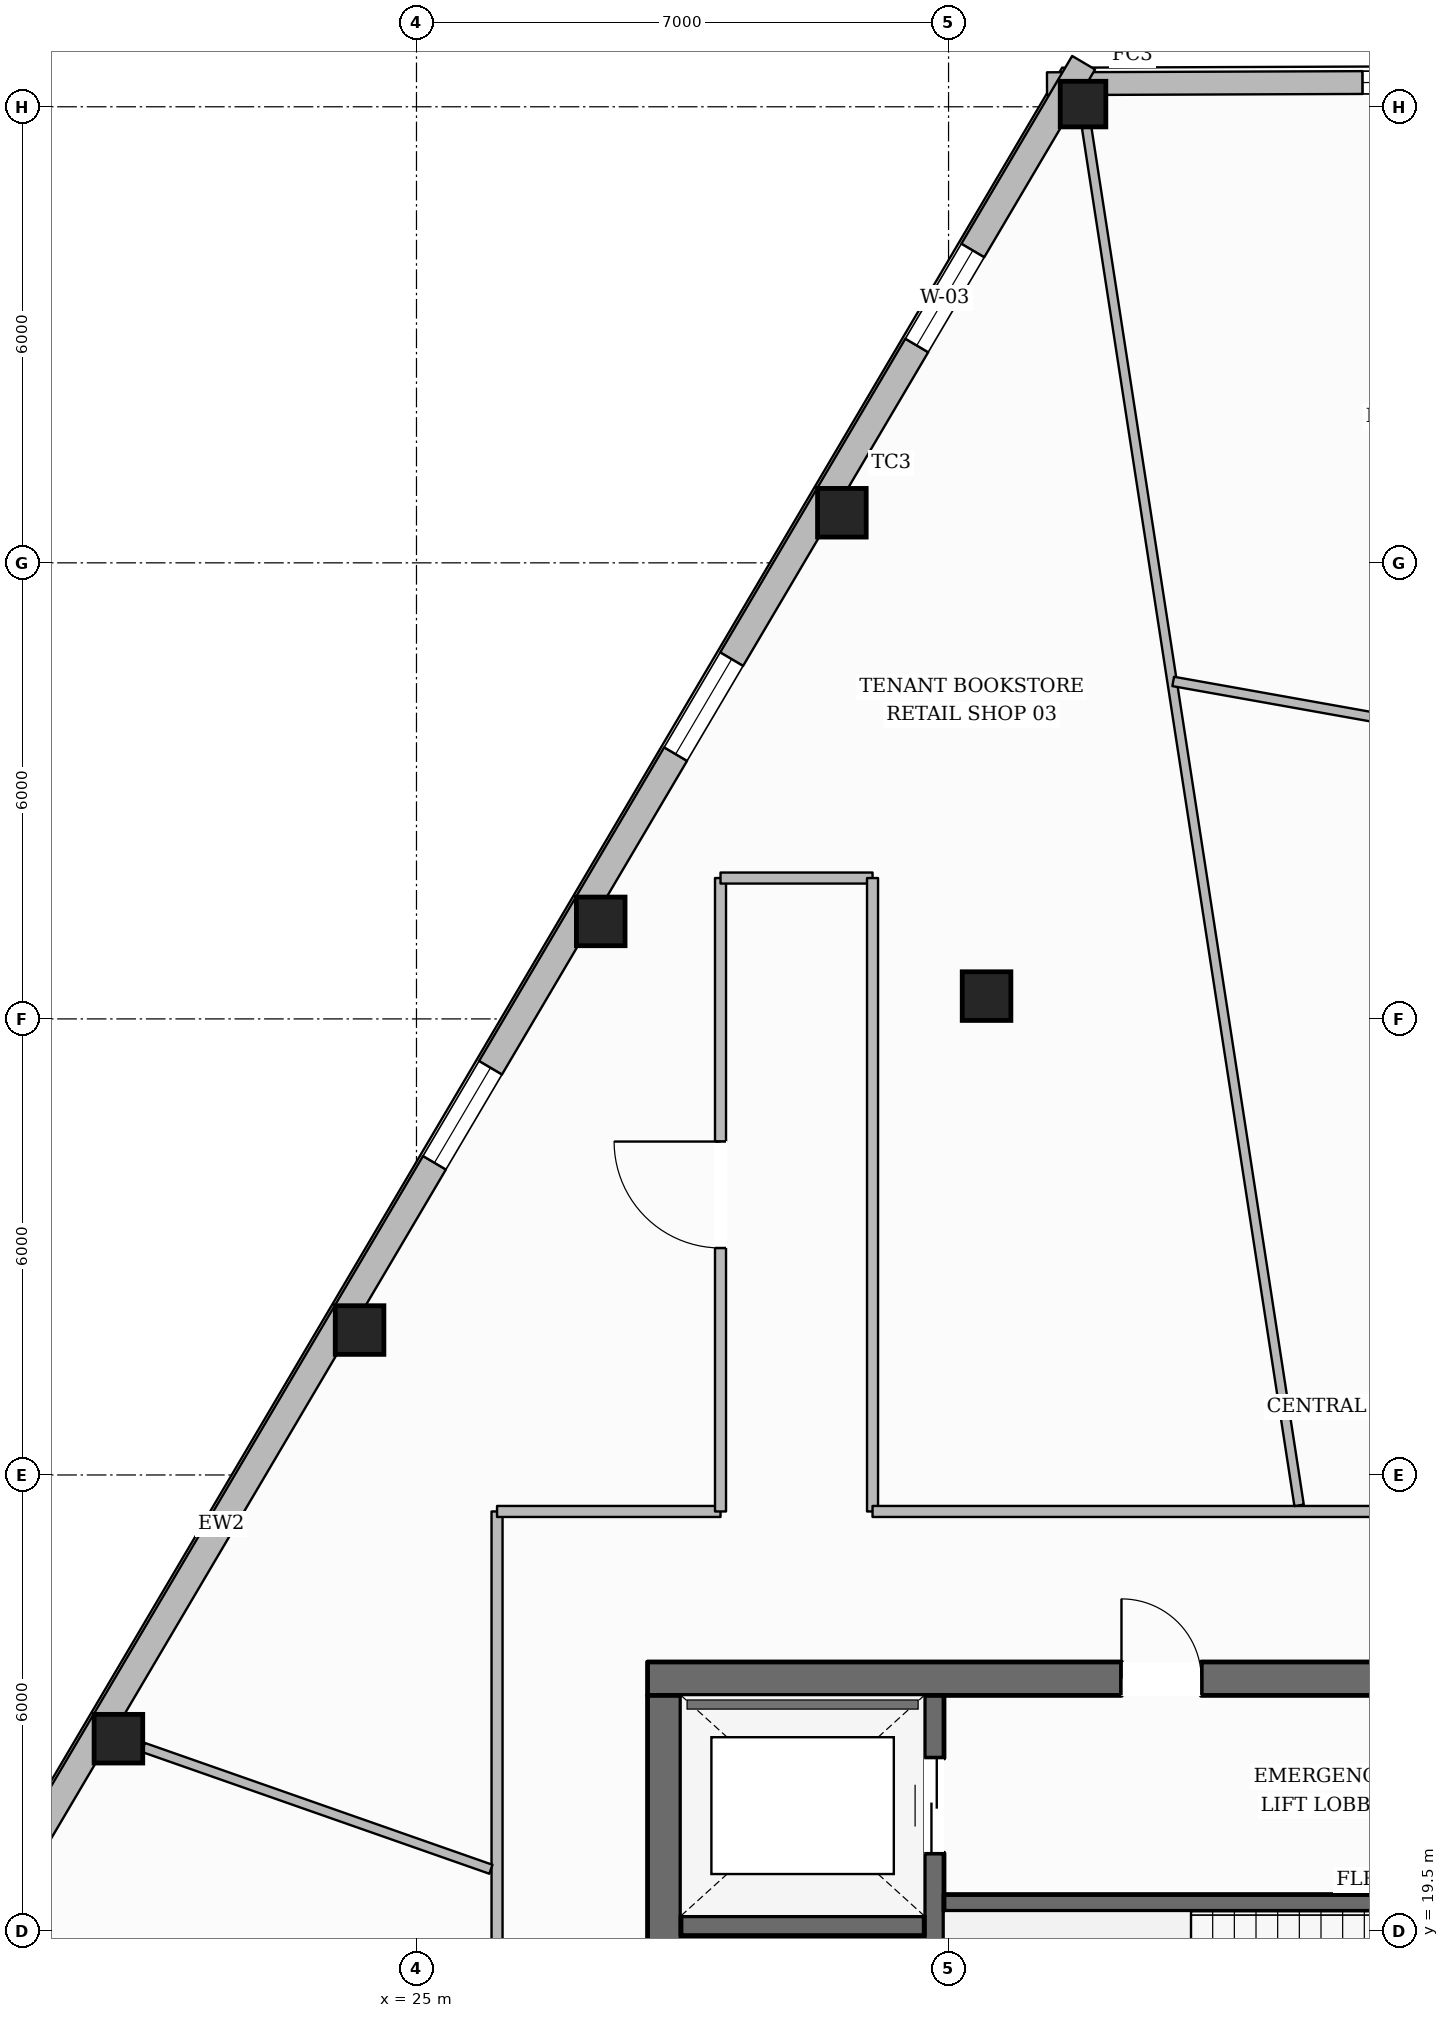
"""IFC4 building model, lengths in metres.
Left out: names, types, materials, properties, quantities, classifications, styles, units other than length and angle.
Written with IfcOpenShell. Run it as: python <this file> out.ifc"""

import sys

from ifc_helpers import new_model, si_unit, direction, frame, frame_2d, origin, origin_2d, place, context, subcontext, project, spatial, rectangle, hollow_rectangle, extrude, element, fill, save


model = new_model("IFC4")
c1 = context("Model", 3, precision=1e-05, world=origin(), true_north=direction((0.0, 1.0)))
c2 = subcontext(c1, "Body", "Model", "MODEL_VIEW")
j1 = project(units=[si_unit("LENGTHUNIT", "METRE"), si_unit("PLANEANGLEUNIT", "RADIAN")], contexts=[c1])
p1 = place(None, origin())
s1 = spatial("IfcSite", under=j1, at=p1, CompositionType="ELEMENT")
p2 = place(p1, origin())
s2 = spatial("IfcBuilding", under=s1, at=p2, CompositionType="ELEMENT")
p3 = place(p2, frame((0.0, 0.0, 207.35)))
s3 = spatial("IfcBuildingStorey", under=s2, at=p3, CompositionType="ELEMENT", Elevation=207.35)
p4 = place(p3, frame((28.04, 22.82, 0.0), z_axis=(0.0, 0.0, 1.0), x_axis=(1.0, 0.0, 0.0)))
e1 = element("IfcWall", 1, at=p4, inside=s3, PredefinedType="SOLIDWALL", context=c2, shape_type="SweptSolid", body=[
    extrude(rectangle(XDim=19.92, YDim=0.44, at=frame_2d((9.96, 0.0))), origin(), (0.0, 0.0, 1.0), 3.6),
])
p5 = place(p4, frame((6.235, 0.0, 0.0)))
e2 = element("IfcOpeningElement", 2, at=p5, cuts=e1, PredefinedType="OPENING", context=c2, shape_type="SweptSolid", body=[
    extrude(rectangle(XDim=1.05, YDim=2.15, at=frame_2d((0.525, 1.075))), frame((0.0, 0.23, 0.0), z_axis=(0.0, -1.0, 0.0), x_axis=(1.0, 0.0, 0.0)), (0.0, 0.0, 1.0), 0.46),
])
p6 = place(p4, frame((12.635, 0.0, 0.0)))
e3 = element("IfcOpeningElement", 3, at=p6, cuts=e1, PredefinedType="OPENING", context=c2, shape_type="SweptSolid", body=[
    extrude(rectangle(XDim=1.05, YDim=2.15, at=frame_2d((0.525, 1.075))), frame((0.0, 0.23, 0.0), z_axis=(0.0, -1.0, 0.0), x_axis=(1.0, 0.0, 0.0)), (0.0, 0.0, 1.0), 0.46),
])
p7 = place(p3, frame((28.26, 9.6, 0.0), z_axis=(0.0, 0.0, 1.0), x_axis=(0.0, 1.0, 0.0)))
e4 = element("IfcWall", 4, at=p7, inside=s3, PredefinedType="SOLIDWALL", context=c2, shape_type="SweptSolid", body=[
    extrude(rectangle(XDim=13.0, YDim=0.44, at=frame_2d((6.5, 0.0))), origin(), (0.0, 0.0, 1.0), 3.6),
])
p8 = place(p7, frame((0.2, 0.0, 0.0)))
e5 = element("IfcOpeningElement", 5, at=p8, cuts=e4, PredefinedType="OPENING", context=c2, shape_type="SweptSolid", body=[
    extrude(rectangle(XDim=1.1, YDim=2.15, at=frame_2d((0.55, 1.075))), frame((0.0, 0.23, 0.0), z_axis=(0.0, -1.0, 0.0), x_axis=(1.0, 0.0, 0.0)), (0.0, 0.0, 1.0), 0.46),
])
p9 = place(p7, frame((8.4, 0.0, 0.0)))
e6 = element("IfcOpeningElement", 6, at=p9, cuts=e4, PredefinedType="OPENING", context=c2, shape_type="SweptSolid", body=[
    extrude(rectangle(XDim=0.9, YDim=2.1, at=frame_2d((0.45, 1.05))), frame((0.0, 0.23, 0.0), z_axis=(0.0, -1.0, 0.0), x_axis=(1.0, 0.0, 0.0)), (0.0, 0.0, 1.0), 0.46),
])
p10 = place(p3, frame((31.81, 9.6, 0.0), z_axis=(0.0, 0.0, 1.0), x_axis=(0.0, 1.0, 0.0)))
e7 = element("IfcWall", 7, at=p10, inside=s3, PredefinedType="SHEAR", context=c2, shape_type="SweptSolid", body=[
    extrude(rectangle(XDim=13.0, YDim=0.26, at=frame_2d((6.5, 0.0))), origin(), (0.0, 0.0, 1.0), 3.6),
])
p11 = place(p10, frame((10.925, 0.0, 0.0)))
e8 = element("IfcOpeningElement", 8, at=p11, cuts=e7, PredefinedType="OPENING", context=c2, shape_type="SweptSolid", body=[
    extrude(rectangle(XDim=1.25, YDim=2.25, at=frame_2d((0.625, 1.125))), frame((0.0, 0.14, 0.0), z_axis=(0.0, -1.0, 0.0), x_axis=(1.0, 0.0, 0.0)), (0.0, 0.0, 1.0), 0.28),
])
p12 = place(p3, frame((28.48, 19.57, 0.0), z_axis=(0.0, 0.0, 1.0), x_axis=(1.0, 0.0, 0.0)))
e9 = element("IfcWall", 9, at=p12, inside=s3, PredefinedType="SHEAR", context=c2, shape_type="SweptSolid", body=[
    extrude(rectangle(XDim=3.2, YDim=0.26, at=frame_2d((1.6, 0.0))), origin(), (0.0, 0.0, 1.0), 3.6),
])
p13 = place(p3, frame((31.94, 19.87, 0.0), z_axis=(0.0, 0.0, 1.0), x_axis=(1.0, 0.0, 0.0)))
e10 = element("IfcWall", 10, at=p13, inside=s3, PredefinedType="SOLIDWALL", context=c2, shape_type="SweptSolid", body=[
    extrude(rectangle(XDim=12.12, YDim=0.22, at=frame_2d((6.06, 0.0))), origin(), (0.0, 0.0, 1.0), 3.6),
])
p14 = place(p13, frame((6.3, 0.0, 0.0)))
e11 = element("IfcOpeningElement", 11, at=p14, cuts=e10, PredefinedType="OPENING", context=c2, shape_type="SweptSolid", body=[
    extrude(rectangle(XDim=1.1, YDim=2.15, at=frame_2d((0.55, 1.075))), frame((0.0, 0.12, 0.0), z_axis=(0.0, -1.0, 0.0), x_axis=(1.0, 0.0, 0.0)), (0.0, 0.0, 1.0), 0.24),
])
p15 = place(p13, frame((8.23, 0.0, 0.0)))
e12 = element("IfcOpeningElement", 12, at=p15, cuts=e10, PredefinedType="OPENING", context=c2, shape_type="SweptSolid", body=[
    extrude(rectangle(XDim=0.9, YDim=2.1, at=frame_2d((0.45, 1.05))), frame((0.0, 0.12, 0.0), z_axis=(0.0, -1.0, 0.0), x_axis=(1.0, 0.0, 0.0)), (0.0, 0.0, 1.0), 0.24),
])
p16 = place(p13, frame((10.45, 0.0, 0.0)))
e13 = element("IfcOpeningElement", 13, at=p16, cuts=e10, PredefinedType="OPENING", context=c2, shape_type="SweptSolid", body=[
    extrude(rectangle(XDim=0.9, YDim=2.1, at=frame_2d((0.45, 1.05))), frame((0.0, 0.12, 0.0), z_axis=(0.0, -1.0, 0.0), x_axis=(1.0, 0.0, 0.0)), (0.0, 0.0, 1.0), 0.24),
])
p17 = place(p3, frame((33.769, 43.535, 0.0), z_axis=(0.0, 0.0, 1.0), x_axis=(1.0, 0.0, 0.0)))
e14 = element("IfcColumn", 14, at=p17, inside=s3, PredefinedType="COLUMN", context=c2, shape_type="SweptSolid", body=[
    extrude(hollow_rectangle(XDim=0.6, YDim=0.6, WallThickness=0.028, at=origin_2d()), origin(), (0.0, 0.0, 1.0), 3.6),
])
for number, where, z_axis, x_axis in (
    (15, (30.597, 38.159, 0.0), (0.0, 0.0, 1.0), (1.0, 0.0, 0.0)),
    (16, (27.424, 32.783, 0.0), (0.0, 0.0, 1.0), (1.0, 0.0, 0.0)),
    (17, (24.251, 27.407, 0.0), (0.0, 0.0, 1.0), (1.0, 0.0, 0.0)),
    (18, (21.079, 22.031, 0.0), (0.0, 0.0, 1.0), (1.0, 0.0, 0.0)),
    (19, (32.5, 31.8, 0.0), (0.0, 0.0, 1.0), (1.0, 0.0, 0.0)),
):
    element("IfcColumn", number, at=place(p3, frame(where, z_axis=z_axis, x_axis=x_axis)), inside=s3, PredefinedType="COLUMN", context=c2, shape_type="SweptSolid", body=[
        extrude(hollow_rectangle(XDim=0.64, YDim=0.64, WallThickness=0.028, at=origin_2d()), origin(), (0.0, 0.0, 1.0), 3.6),
    ])
p18 = place(p3, frame((33.295, 43.804, 0.0), z_axis=(0.0, 0.0, 1.0), x_axis=(0.999993419862, 0.003627703449, 0.0)))
e20 = element("IfcWall", 20, at=p18, inside=s3, PredefinedType="STANDARD", context=c2, shape_type="SweptSolid", body=[
    extrude(rectangle(XDim=9.354, YDim=0.3, at=frame_2d((4.677, 0.0))), origin(), (0.0, 0.0, 1.0), 3.132),
])
p19 = place(p18, frame((4.152, 0.0, 0.65)))
e21 = element("IfcOpeningElement", 21, at=p19, cuts=e20, PredefinedType="OPENING", context=c2, shape_type="SweptSolid", body=[
    extrude(rectangle(XDim=1.05, YDim=1.7, at=frame_2d((0.525, 0.85))), frame((0.0, 0.16, 0.0), z_axis=(0.0, -1.0, 0.0), x_axis=(1.0, 0.0, 0.0)), (0.0, 0.0, 1.0), 0.32),
])
p20 = place(p3, frame((14.256, 11.0, 0.0), z_axis=(0.0, 0.0, 1.0), x_axis=(0.508231558921, 0.861220461042, 0.0)))
e22 = element("IfcWall", 22, at=p20, inside=s3, PredefinedType="STANDARD", context=c2, shape_type="SweptSolid", body=[
    extrude(rectangle(XDim=38.41, YDim=0.35, at=frame_2d((19.205, 0.0))), origin(), (0.0, 0.0, 1.0), 3.132),
])
p21 = place(p20, frame((34.091, 0.0, 0.65)))
e23 = element("IfcOpeningElement", 23, at=p21, cuts=e22, PredefinedType="OPENING", context=c2, shape_type="SweptSolid", body=[
    extrude(rectangle(XDim=1.45, YDim=1.75, at=frame_2d((0.725, 0.875))), frame((0.0, 0.185, 0.0), z_axis=(0.0, -1.0, 0.0), x_axis=(1.0, 0.0, 0.0)), (0.0, 0.0, 1.0), 0.37),
])
p22 = place(p20, frame((27.848, 0.0, 0.65)))
e24 = element("IfcOpeningElement", 24, at=p22, cuts=e22, PredefinedType="OPENING", context=c2, shape_type="SweptSolid", body=[
    extrude(rectangle(XDim=1.45, YDim=1.75, at=frame_2d((0.725, 0.875))), frame((0.0, 0.185, 0.0), z_axis=(0.0, -1.0, 0.0), x_axis=(1.0, 0.0, 0.0)), (0.0, 0.0, 1.0), 0.37),
])
p23 = place(p20, frame((21.606, 0.0, 0.65)))
e25 = element("IfcOpeningElement", 25, at=p23, cuts=e22, PredefinedType="OPENING", context=c2, shape_type="SweptSolid", body=[
    extrude(rectangle(XDim=1.45, YDim=1.75, at=frame_2d((0.725, 0.875))), frame((0.0, 0.185, 0.0), z_axis=(0.0, -1.0, 0.0), x_axis=(1.0, 0.0, 0.0)), (0.0, 0.0, 1.0), 0.37),
])
p24 = place(p20, frame((9.121, 0.0, 0.65)))
e26 = element("IfcOpeningElement", 26, at=p24, cuts=e22, PredefinedType="OPENING", context=c2, shape_type="SweptSolid", body=[
    extrude(rectangle(XDim=1.45, YDim=1.75, at=frame_2d((0.725, 0.875))), frame((0.0, 0.185, 0.0), z_axis=(0.0, -1.0, 0.0), x_axis=(1.0, 0.0, 0.0)), (0.0, 0.0, 1.0), 0.37),
])
p25 = place(p20, frame((2.878, 0.0, 0.65)))
e27 = element("IfcOpeningElement", 27, at=p25, cuts=e22, PredefinedType="OPENING", context=c2, shape_type="SweptSolid", body=[
    extrude(rectangle(XDim=1.45, YDim=1.75, at=frame_2d((0.725, 0.875))), frame((0.0, 0.185, 0.0), z_axis=(0.0, -1.0, 0.0), x_axis=(1.0, 0.0, 0.0)), (0.0, 0.0, 1.0), 0.37),
])
p26 = place(p3, frame((26.06, 17.65, 0.0), z_axis=(0.0, 0.0, 1.0), x_axis=(0.0, 1.0, 0.0)))
e28 = element("IfcWall", 28, at=p26, inside=s3, PredefinedType="PARTITIONING", context=c2, shape_type="SweptSolid", body=[
    extrude(rectangle(XDim=7.37, YDim=0.145, at=frame_2d((3.685, 0.0))), origin(), (0.0, 0.0, 1.0), 3.339),
])
p27 = place(p3, frame((26.06, 25.02, 0.0), z_axis=(0.0, 0.0, 1.0), x_axis=(1.0, 0.0, 0.0)))
e29 = element("IfcWall", 29, at=p27, inside=s3, PredefinedType="PARTITIONING", context=c2, shape_type="SweptSolid", body=[
    extrude(rectangle(XDim=2.94, YDim=0.145, at=frame_2d((1.47, 0.0))), origin(), (0.0, 0.0, 1.0), 3.6),
])
p28 = place(p3, frame((29.0, 25.02, 0.0), z_axis=(0.0, 0.0, 1.0), x_axis=(0.0, 1.0, 0.0)))
e30 = element("IfcWall", 30, at=p28, inside=s3, PredefinedType="PARTITIONING", context=c2, shape_type="SweptSolid", body=[
    extrude(rectangle(XDim=8.333, YDim=0.145, at=frame_2d((4.167, 0.0))), origin(), (0.0, 0.0, 1.0), 3.6),
])
p29 = place(p28, frame((3.467, 0.0, 0.0)))
e31 = element("IfcOpeningElement", 31, at=p29, cuts=e30, PredefinedType="OPENING", context=c2, shape_type="SweptSolid", body=[
    extrude(rectangle(XDim=1.4, YDim=2.2, at=frame_2d((0.7, 1.1))), frame((0.0, 0.083, 0.0), z_axis=(0.0, -1.0, 0.0), x_axis=(1.0, 0.0, 0.0)), (0.0, 0.0, 1.0), 0.165),
])
p30 = place(p3, frame((29.0, 33.353, 0.0), z_axis=(0.0, 0.0, 1.0), x_axis=(1.0, 0.0, 0.0)))
e32 = element("IfcWall", 32, at=p30, inside=s3, PredefinedType="PARTITIONING", context=c2, shape_type="SweptSolid", body=[
    extrude(rectangle(XDim=2.0, YDim=0.145, at=frame_2d((1.0, 0.0))), origin(), (0.0, 0.0, 1.0), 3.6),
])
p31 = place(p3, frame((31.0, 33.353, 0.0), z_axis=(0.0, 0.0, 1.0), x_axis=(0.0, -1.0, 0.0)))
e33 = element("IfcWall", 33, at=p31, inside=s3, PredefinedType="PARTITIONING", context=c2, shape_type="SweptSolid", body=[
    extrude(rectangle(XDim=8.333, YDim=0.145, at=frame_2d((4.167, 0.0))), origin(), (0.0, 0.0, 1.0), 3.6),
])
p32 = place(p3, frame((31.0, 25.02, 0.0), z_axis=(0.0, 0.0, 1.0), x_axis=(1.0, 0.0, 0.0)))
e34 = element("IfcWall", 34, at=p32, inside=s3, PredefinedType="PARTITIONING", context=c2, shape_type="SweptSolid", body=[
    extrude(rectangle(XDim=14.0, YDim=0.145, at=frame_2d((7.0, 0.0))), origin(), (0.0, 0.0, 1.0), 3.6),
])
p33 = place(p32, frame((9.021, 0.0, 0.0)))
e35 = element("IfcOpeningElement", 35, at=p33, cuts=e34, PredefinedType="OPENING", context=c2, shape_type="SweptSolid", body=[
    extrude(rectangle(XDim=1.4, YDim=2.2, at=frame_2d((0.7, 1.1))), frame((0.0, 0.083, 0.0), z_axis=(0.0, -1.0, 0.0), x_axis=(1.0, 0.0, 0.0)), (0.0, 0.0, 1.0), 0.165),
])
p34 = place(p3, frame((36.612, 25.101, 0.0), z_axis=(0.0, 0.0, 1.0), x_axis=(-0.152413268287, 0.988316849826, 0.0)))
e36 = element("IfcWall", 36, at=p34, inside=s3, PredefinedType="PARTITIONING", context=c2, shape_type="SweptSolid", body=[
    extrude(rectangle(XDim=18.341, YDim=0.125, at=frame_2d((9.17, 0.0))), origin(), (0.0, 0.0, 1.0), 3.141),
])
p35 = place(p3, frame((25.979, 20.313, 0.0), z_axis=(0.0, 0.0, 1.0), x_axis=(-0.943724740231, 0.330731937794, 0.0)))
e37 = element("IfcWall", 37, at=p35, inside=s3, PredefinedType="PARTITIONING", context=c2, shape_type="SweptSolid", body=[
    extrude(rectangle(XDim=4.845, YDim=0.125, at=frame_2d((2.423, 0.0))), origin(), (0.0, 0.0, 1.0), 3.6),
])
p36 = place(p3, frame((48.155, 33.585, 0.0), z_axis=(0.0, 0.0, 1.0), x_axis=(-0.98445311225, 0.175647572661, 0.0)))
e38 = element("IfcWall", 38, at=p36, inside=s3, PredefinedType="PARTITIONING", context=c2, shape_type="SweptSolid", body=[
    extrude(rectangle(XDim=13.407, YDim=0.125, at=frame_2d((6.704, 0.0))), origin(), (0.0, 0.0, 1.0), 3.6),
])
p37 = place(p36, frame((6.104, 0.0, 0.0)))
e39 = element("IfcOpeningElement", 39, at=p37, cuts=e38, PredefinedType="OPENING", context=c2, shape_type="SweptSolid", body=[
    extrude(rectangle(XDim=0.98, YDim=2.15, at=frame_2d((0.49, 1.075))), frame((0.0, 0.073, 0.0), z_axis=(0.0, -1.0, 0.0), x_axis=(1.0, 0.0, 0.0)), (0.0, 0.0, 1.0), 0.145),
])
p38 = place(p21, origin())
e40 = element("IfcWindow", 40, at=p38, inside=s3, PartitioningType="SINGLE_PANEL", PredefinedType="WINDOW", context=c2, shape_type="SweptSolid", body=[
    extrude(rectangle(XDim=1.45, YDim=1.75, at=frame_2d((0.725, 0.875))), frame((0.0, 0.03, 0.0), z_axis=(0.0, -1.0, 0.0), x_axis=(1.0, 0.0, 0.0)), (0.0, 0.0, 1.0), 0.06),
])
fill(e23, e40)
p39 = place(p22, origin())
e41 = element("IfcWindow", 41, at=p39, inside=s3, PartitioningType="SINGLE_PANEL", PredefinedType="WINDOW", context=c2, shape_type="SweptSolid", body=[
    extrude(rectangle(XDim=1.45, YDim=1.75, at=frame_2d((0.725, 0.875))), frame((0.0, 0.03, 0.0), z_axis=(0.0, -1.0, 0.0), x_axis=(1.0, 0.0, 0.0)), (0.0, 0.0, 1.0), 0.06),
])
fill(e24, e41)
p40 = place(p23, origin())
e42 = element("IfcWindow", 42, at=p40, inside=s3, PartitioningType="SINGLE_PANEL", PredefinedType="WINDOW", context=c2, shape_type="SweptSolid", body=[
    extrude(rectangle(XDim=1.45, YDim=1.75, at=frame_2d((0.725, 0.875))), frame((0.0, 0.03, 0.0), z_axis=(0.0, -1.0, 0.0), x_axis=(1.0, 0.0, 0.0)), (0.0, 0.0, 1.0), 0.06),
])
fill(e25, e42)
p41 = place(p19, origin())
e43 = element("IfcWindow", 43, at=p41, inside=s3, PartitioningType="SINGLE_PANEL", PredefinedType="WINDOW", context=c2, shape_type="SweptSolid", body=[
    extrude(rectangle(XDim=1.05, YDim=1.7, at=frame_2d((0.525, 0.85))), frame((0.0, 0.03, 0.0), z_axis=(0.0, -1.0, 0.0), x_axis=(1.0, 0.0, 0.0)), (0.0, 0.0, 1.0), 0.06),
])
fill(e21, e43)
p42 = place(p5, origin())
e44 = element("IfcDoor", 44, at=p42, inside=s3, OperationType="SINGLE_SWING_LEFT", PredefinedType="DOOR", context=c2, shape_type="SweptSolid", body=[
    extrude(rectangle(XDim=1.05, YDim=2.15, at=frame_2d((0.525, 1.075))), frame((0.0, 0.025, 0.0), z_axis=(0.0, -1.0, 0.0), x_axis=(1.0, 0.0, 0.0)), (0.0, 0.0, 1.0), 0.05),
])
fill(e2, e44)
p43 = place(p11, origin())
e45 = element("IfcDoor", 45, at=p43, inside=s3, OperationType="DOUBLE_DOOR_SLIDING", PredefinedType="DOOR", context=c2, shape_type="SweptSolid", body=[
    extrude(rectangle(XDim=1.25, YDim=2.25, at=frame_2d((0.625, 1.125))), frame((0.0, 0.025, 0.0), z_axis=(0.0, -1.0, 0.0), x_axis=(1.0, 0.0, 0.0)), (0.0, 0.0, 1.0), 0.05),
])
fill(e8, e45)
p44 = place(p29, origin())
e46 = element("IfcDoor", 46, at=p44, inside=s3, OperationType="SINGLE_SWING_RIGHT", PredefinedType="DOOR", context=c2, shape_type="SweptSolid", body=[
    extrude(rectangle(XDim=1.4, YDim=2.2, at=frame_2d((0.7, 1.1))), frame((0.0, 0.025, 0.0), z_axis=(0.0, -1.0, 0.0), x_axis=(1.0, 0.0, 0.0)), (0.0, 0.0, 1.0), 0.05),
])
fill(e31, e46)
save(model, sys.argv[1])
